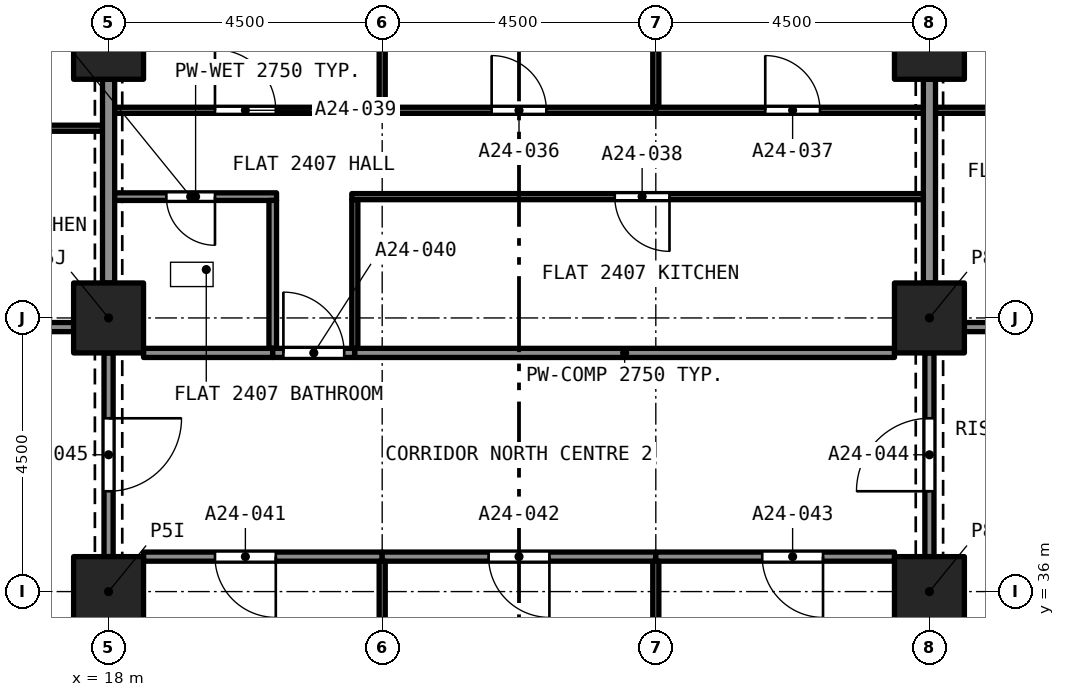
"""IFC4 building model, lengths in metres.
Left out: names, types, materials, properties, quantities, classifications, styles, units other than length and angle.
Written with IfcOpenShell. Run it as: python <this file> out.ifc"""

import sys

from ifc_helpers import new_model, si_unit, direction, frame, frame_2d, origin, origin_2d, place, context, subcontext, project, spatial, rectangle, extrude, element, fill, save


model = new_model("IFC4")
c1 = context("Model", 3, precision=1e-05, world=origin(), true_north=direction((0.0, 1.0)))
c2 = subcontext(c1, "Body", "Model", "MODEL_VIEW")
j1 = project(units=[si_unit("LENGTHUNIT", "METRE"), si_unit("PLANEANGLEUNIT", "RADIAN")], contexts=[c1])
p1 = place(None, origin())
s1 = spatial("IfcSite", under=j1, at=p1, CompositionType="ELEMENT")
p2 = place(p1, origin())
s2 = spatial("IfcBuilding", under=s1, at=p2, CompositionType="ELEMENT")
p3 = place(p2, frame((0.0, 0.0, 89.6)))
s3 = spatial("IfcBuildingStorey", under=s2, at=p3, CompositionType="ELEMENT", Elevation=89.6)
for number, where, z_axis, x_axis in (
    (1, (18.0, 36.0, 0.0), (0.0, 0.0, 1.0), (1.0, 0.0, 0.0)),
    (2, (31.5, 36.0, 0.0), (0.0, 0.0, 1.0), (1.0, 0.0, 0.0)),
    (3, (18.0, 40.5, 0.0), (0.0, 0.0, 1.0), (1.0, 0.0, 0.0)),
    (4, (31.5, 40.5, 0.0), (0.0, 0.0, 1.0), (1.0, 0.0, 0.0)),
    (5, (18.0, 45.0, 0.0), (0.0, 0.0, 1.0), (1.0, 0.0, 0.0)),
    (6, (31.5, 45.0, 0.0), (0.0, 0.0, 1.0), (1.0, 0.0, 0.0)),
):
    element("IfcColumn", number, at=place(p3, frame(where, z_axis=z_axis, x_axis=x_axis)), inside=s3, PredefinedType="COLUMN", context=c2, shape_type="SweptSolid", body=[
        extrude(rectangle(XDim=1.15, YDim=1.15, at=origin_2d()), origin(), (0.0, 0.0, 1.0), 3.2),
    ])
p4 = place(p3, frame((17.9, 43.62, 0.0), z_axis=(0.0, 0.0, 1.0), x_axis=(-1.0, 0.0, 0.0)))
e7 = element("IfcWall", 7, at=p4, inside=s3, PredefinedType="PARTITIONING", context=c2, shape_type="SweptSolid", body=[
    extrude(rectangle(XDim=6.172, YDim=0.1, at=frame_2d((3.086, 0.0))), origin(), (0.0, 0.0, 1.0), 2.9),
])
p5 = place(p4, frame((2.586, 0.0, 0.0)))
e8 = element("IfcOpeningElement", 8, at=p5, cuts=e7, PredefinedType="OPENING", context=c2, shape_type="SweptSolid", body=[
    extrude(rectangle(XDim=0.9, YDim=2.1, at=frame_2d((0.45, 1.05))), frame((0.0, 0.06, 0.0), z_axis=(0.0, -1.0, 0.0), x_axis=(1.0, 0.0, 0.0)), (0.0, 0.0, 1.0), 0.12),
])
p6 = place(p3, frame((18.0, 41.075, 0.0), z_axis=(0.0, 0.0, 1.0), x_axis=(0.0, 1.0, 0.0)))
e9 = element("IfcWall", 9, at=p6, inside=s3, PredefinedType="PARTITIONING", context=c2, shape_type="SweptSolid", body=[
    extrude(rectangle(XDim=3.35, YDim=0.2, at=frame_2d((1.675, 0.0))), origin(), (0.0, 0.0, 1.0), 2.38),
])
p7 = place(p3, frame((13.35, 40.35, 0.0), z_axis=(0.0, 0.0, 1.0), x_axis=(1.0, 0.0, 0.0)))
e10 = element("IfcWall", 10, at=p7, inside=s3, PredefinedType="PARTITIONING", context=c2, shape_type="SweptSolid", body=[
    extrude(rectangle(XDim=4.075, YDim=0.15, at=frame_2d((2.038, 0.0))), origin(), (0.0, 0.0, 1.0), 2.9),
])
p8 = place(p3, frame((31.6, 43.915, 0.0), z_axis=(0.0, 0.0, 1.0), x_axis=(1.0, 0.0, 0.0)))
e11 = element("IfcWall", 11, at=p8, inside=s3, PredefinedType="PARTITIONING", context=c2, shape_type="SweptSolid", body=[
    extrude(rectangle(XDim=4.4, YDim=0.1, at=frame_2d((2.2, 0.0))), origin(), (0.0, 0.0, 1.0), 2.9),
])
p9 = place(p8, frame((1.65, 0.0, 0.0)))
e12 = element("IfcOpeningElement", 12, at=p9, cuts=e11, PredefinedType="OPENING", context=c2, shape_type="SweptSolid", body=[
    extrude(rectangle(XDim=1.0, YDim=2.1, at=frame_2d((0.5, 1.05))), frame((0.0, 0.06, 0.0), z_axis=(0.0, -1.0, 0.0), x_axis=(1.0, 0.0, 0.0)), (0.0, 0.0, 1.0), 0.12),
])
p10 = place(p3, frame((31.5, 41.075, 0.0), z_axis=(0.0, 0.0, 1.0), x_axis=(0.0, 1.0, 0.0)))
e13 = element("IfcWall", 13, at=p10, inside=s3, PredefinedType="PARTITIONING", context=c2, shape_type="SweptSolid", body=[
    extrude(rectangle(XDim=3.35, YDim=0.2, at=frame_2d((1.675, 0.0))), origin(), (0.0, 0.0, 1.0), 2.38),
])
p11 = place(p3, frame((32.075, 40.35, 0.0), z_axis=(0.0, 0.0, 1.0), x_axis=(1.0, 0.0, 0.0)))
e14 = element("IfcWall", 14, at=p11, inside=s3, PredefinedType="PARTITIONING", context=c2, shape_type="SweptSolid", body=[
    extrude(rectangle(XDim=2.35, YDim=0.15, at=frame_2d((1.175, 0.0))), origin(), (0.0, 0.0, 1.0), 2.9),
])
p12 = place(p11, frame((1.175, 0.0, 0.0)))
e15 = element("IfcOpeningElement", 15, at=p12, cuts=e14, PredefinedType="OPENING", context=c2, shape_type="SweptSolid", body=[
    extrude(rectangle(XDim=1.0, YDim=2.1, at=frame_2d((0.5, 1.05))), frame((0.0, 0.085, 0.0), z_axis=(0.0, -1.0, 0.0), x_axis=(1.0, 0.0, 0.0)), (0.0, 0.0, 1.0), 0.17),
])
p13 = place(p3, frame((20.762, 42.495, 0.0), z_axis=(0.0, 0.0, 1.0), x_axis=(-1.0, 0.0, 0.0)))
e16 = element("IfcWall", 16, at=p13, inside=s3, PredefinedType="PARTITIONING", context=c2, shape_type="SweptSolid", body=[
    extrude(rectangle(XDim=2.662, YDim=0.125, at=frame_2d((1.331, 0.0))), origin(), (0.0, 0.0, 1.0), 2.75),
])
p14 = place(p13, frame((1.012, 0.0, 0.0)))
e17 = element("IfcOpeningElement", 17, at=p14, cuts=e16, PredefinedType="OPENING", context=c2, shape_type="SweptSolid", body=[
    extrude(rectangle(XDim=0.8, YDim=2.1, at=frame_2d((0.4, 1.05))), frame((0.0, 0.073, 0.0), z_axis=(0.0, -1.0, 0.0), x_axis=(1.0, 0.0, 0.0)), (0.0, 0.0, 1.0), 0.145),
])
p15 = place(p3, frame((20.7, 40.0, 0.0), z_axis=(0.0, 0.0, 1.0), x_axis=(0.0, 1.0, 0.0)))
e18 = element("IfcWall", 18, at=p15, inside=s3, PredefinedType="PARTITIONING", context=c2, shape_type="SweptSolid", body=[
    extrude(rectangle(XDim=2.433, YDim=0.125, at=frame_2d((1.216, 0.0))), origin(), (0.0, 0.0, 1.0), 2.75),
])
p16 = place(p3, frame((18.575, 39.925, 0.0), z_axis=(0.0, 0.0, 1.0), x_axis=(1.0, 0.0, 0.0)))
e19 = element("IfcWall", 19, at=p16, inside=s3, PredefinedType="PARTITIONING", context=c2, shape_type="SweptSolid", body=[
    extrude(rectangle(XDim=2.125, YDim=0.15, at=frame_2d((1.062, 0.0))), origin(), (0.0, 0.0, 1.0), 2.75),
])
p17 = place(p3, frame((27.0, 43.965, 0.0), z_axis=(0.0, 0.0, 1.0), x_axis=(0.0, 1.0, 0.0)))
e20 = element("IfcWall", 20, at=p17, inside=s3, PredefinedType="PARTITIONING", context=c2, shape_type="SweptSolid", body=[
    extrude(rectangle(XDim=4.96, YDim=0.1, at=frame_2d((2.48, 0.0))), origin(), (0.0, 0.0, 1.0), 2.75),
])
p18 = place(p3, frame((22.5, 43.915, 0.0), z_axis=(0.0, 0.0, 1.0), x_axis=(1.0, 0.0, 0.0)))
e21 = element("IfcWall", 21, at=p18, inside=s3, PredefinedType="PARTITIONING", context=c2, shape_type="SweptSolid", body=[
    extrude(rectangle(XDim=4.5, YDim=0.1, at=frame_2d((2.25, 0.0))), origin(), (0.0, 0.0, 1.0), 2.75),
])
p19 = place(p18, frame((1.8, 0.0, 0.0)))
e22 = element("IfcOpeningElement", 22, at=p19, cuts=e21, PredefinedType="OPENING", context=c2, shape_type="SweptSolid", body=[
    extrude(rectangle(XDim=0.9, YDim=2.1, at=frame_2d((0.45, 1.05))), frame((0.0, 0.06, 0.0), z_axis=(0.0, -1.0, 0.0), x_axis=(1.0, 0.0, 0.0)), (0.0, 0.0, 1.0), 0.12),
])
p20 = place(p3, frame((22.5, 43.965, 0.0), z_axis=(0.0, 0.0, 1.0), x_axis=(0.0, 1.0, 0.0)))
e23 = element("IfcWall", 23, at=p20, inside=s3, PredefinedType="PARTITIONING", context=c2, shape_type="SweptSolid", body=[
    extrude(rectangle(XDim=4.96, YDim=0.1, at=frame_2d((2.48, 0.0))), origin(), (0.0, 0.0, 1.0), 2.75),
])
p21 = place(p3, frame((27.0, 43.915, 0.0), z_axis=(0.0, 0.0, 1.0), x_axis=(1.0, 0.0, 0.0)))
e24 = element("IfcWall", 24, at=p21, inside=s3, PredefinedType="PARTITIONING", context=c2, shape_type="SweptSolid", body=[
    extrude(rectangle(XDim=4.4, YDim=0.1, at=frame_2d((2.2, 0.0))), origin(), (0.0, 0.0, 1.0), 2.75),
])
p22 = place(p21, frame((1.8, 0.0, 0.0)))
e25 = element("IfcOpeningElement", 25, at=p22, cuts=e24, PredefinedType="OPENING", context=c2, shape_type="SweptSolid", body=[
    extrude(rectangle(XDim=0.9, YDim=2.1, at=frame_2d((0.45, 1.05))), frame((0.0, 0.06, 0.0), z_axis=(0.0, -1.0, 0.0), x_axis=(1.0, 0.0, 0.0)), (0.0, 0.0, 1.0), 0.12),
])
p23 = place(p3, frame((31.4, 42.495, 0.0), z_axis=(0.0, 0.0, 1.0), x_axis=(-1.0, 0.0, 0.0)))
e26 = element("IfcWall", 26, at=p23, inside=s3, PredefinedType="PARTITIONING", context=c2, shape_type="SweptSolid", body=[
    extrude(rectangle(XDim=9.4, YDim=0.1, at=frame_2d((4.7, 0.0))), origin(), (0.0, 0.0, 1.0), 2.75),
])
p24 = place(p23, frame((4.175, 0.0, 0.0)))
e27 = element("IfcOpeningElement", 27, at=p24, cuts=e26, PredefinedType="OPENING", context=c2, shape_type="SweptSolid", body=[
    extrude(rectangle(XDim=0.9, YDim=2.1, at=frame_2d((0.45, 1.05))), frame((0.0, 0.06, 0.0), z_axis=(0.0, -1.0, 0.0), x_axis=(1.0, 0.0, 0.0)), (0.0, 0.0, 1.0), 0.12),
])
p25 = place(p3, frame((22.05, 40.0, 0.0), z_axis=(0.0, 0.0, 1.0), x_axis=(0.0, 1.0, 0.0)))
e28 = element("IfcWall", 28, at=p25, inside=s3, PredefinedType="PARTITIONING", context=c2, shape_type="SweptSolid", body=[
    extrude(rectangle(XDim=2.445, YDim=0.1, at=frame_2d((1.223, 0.0))), origin(), (0.0, 0.0, 1.0), 2.75),
])
p26 = place(p3, frame((18.1, 43.915, 0.0), z_axis=(0.0, 0.0, 1.0), x_axis=(1.0, 0.0, 0.0)))
e29 = element("IfcWall", 29, at=p26, inside=s3, PredefinedType="PARTITIONING", context=c2, shape_type="SweptSolid", body=[
    extrude(rectangle(XDim=4.4, YDim=0.1, at=frame_2d((2.2, 0.0))), origin(), (0.0, 0.0, 1.0), 2.75),
])
p27 = place(p26, frame((1.65, 0.0, 0.0)))
e30 = element("IfcOpeningElement", 30, at=p27, cuts=e29, PredefinedType="OPENING", context=c2, shape_type="SweptSolid", body=[
    extrude(rectangle(XDim=1.0, YDim=2.1, at=frame_2d((0.5, 1.05))), frame((0.0, 0.06, 0.0), z_axis=(0.0, -1.0, 0.0), x_axis=(1.0, 0.0, 0.0)), (0.0, 0.0, 1.0), 0.12),
])
p28 = place(p3, frame((20.7, 39.925, 0.0), z_axis=(0.0, 0.0, 1.0), x_axis=(1.0, 0.0, 0.0)))
e31 = element("IfcWall", 31, at=p28, inside=s3, PredefinedType="PARTITIONING", context=c2, shape_type="SweptSolid", body=[
    extrude(rectangle(XDim=1.35, YDim=0.15, at=frame_2d((0.675, 0.0))), origin(), (0.0, 0.0, 1.0), 2.75),
])
p29 = place(p28, frame((0.175, 0.0, 0.0)))
e32 = element("IfcOpeningElement", 32, at=p29, cuts=e31, PredefinedType="OPENING", context=c2, shape_type="SweptSolid", body=[
    extrude(rectangle(XDim=1.0, YDim=2.1, at=frame_2d((0.5, 1.05))), frame((0.0, 0.085, 0.0), z_axis=(0.0, -1.0, 0.0), x_axis=(1.0, 0.0, 0.0)), (0.0, 0.0, 1.0), 0.17),
])
p30 = place(p3, frame((22.05, 39.925, 0.0), z_axis=(0.0, 0.0, 1.0), x_axis=(1.0, 0.0, 0.0)))
e33 = element("IfcWall", 33, at=p30, inside=s3, PredefinedType="PARTITIONING", context=c2, shape_type="SweptSolid", body=[
    extrude(rectangle(XDim=8.875, YDim=0.15, at=frame_2d((4.438, 0.0))), origin(), (0.0, 0.0, 1.0), 2.75),
])
p31 = place(p3, frame((22.5, 36.575, 0.0), z_axis=(0.0, 0.0, 1.0), x_axis=(-1.0, 0.0, 0.0)))
e34 = element("IfcWall", 34, at=p31, inside=s3, PredefinedType="PARTITIONING", context=c2, shape_type="SweptSolid", body=[
    extrude(rectangle(XDim=3.925, YDim=0.15, at=frame_2d((1.962, 0.0))), origin(), (0.0, 0.0, 1.0), 2.75),
])
p32 = place(p31, frame((1.75, 0.0, 0.0)))
e35 = element("IfcOpeningElement", 35, at=p32, cuts=e34, PredefinedType="OPENING", context=c2, shape_type="SweptSolid", body=[
    extrude(rectangle(XDim=1.0, YDim=2.1, at=frame_2d((0.5, 1.05))), frame((0.0, 0.085, 0.0), z_axis=(0.0, -1.0, 0.0), x_axis=(1.0, 0.0, 0.0)), (0.0, 0.0, 1.0), 0.17),
])
p33 = place(p3, frame((27.0, 36.575, 0.0), z_axis=(0.0, 0.0, 1.0), x_axis=(-1.0, 0.0, 0.0)))
e36 = element("IfcWall", 36, at=p33, inside=s3, PredefinedType="PARTITIONING", context=c2, shape_type="SweptSolid", body=[
    extrude(rectangle(XDim=4.5, YDim=0.15, at=frame_2d((2.25, 0.0))), origin(), (0.0, 0.0, 1.0), 2.75),
])
p34 = place(p33, frame((1.75, 0.0, 0.0)))
e37 = element("IfcOpeningElement", 37, at=p34, cuts=e36, PredefinedType="OPENING", context=c2, shape_type="SweptSolid", body=[
    extrude(rectangle(XDim=1.0, YDim=2.1, at=frame_2d((0.5, 1.05))), frame((0.0, 0.085, 0.0), z_axis=(0.0, -1.0, 0.0), x_axis=(1.0, 0.0, 0.0)), (0.0, 0.0, 1.0), 0.17),
])
p35 = place(p3, frame((30.925, 36.575, 0.0), z_axis=(0.0, 0.0, 1.0), x_axis=(-1.0, 0.0, 0.0)))
e38 = element("IfcWall", 38, at=p35, inside=s3, PredefinedType="PARTITIONING", context=c2, shape_type="SweptSolid", body=[
    extrude(rectangle(XDim=3.925, YDim=0.15, at=frame_2d((1.962, 0.0))), origin(), (0.0, 0.0, 1.0), 2.75),
])
p36 = place(p35, frame((1.175, 0.0, 0.0)))
e39 = element("IfcOpeningElement", 39, at=p36, cuts=e38, PredefinedType="OPENING", context=c2, shape_type="SweptSolid", body=[
    extrude(rectangle(XDim=1.0, YDim=2.1, at=frame_2d((0.5, 1.05))), frame((0.0, 0.085, 0.0), z_axis=(0.0, -1.0, 0.0), x_axis=(1.0, 0.0, 0.0)), (0.0, 0.0, 1.0), 0.17),
])
p37 = place(p3, frame((31.5, 36.575, 0.0), z_axis=(0.0, 0.0, 1.0), x_axis=(0.0, 1.0, 0.0)))
e40 = element("IfcWall", 40, at=p37, inside=s3, PredefinedType="PARTITIONING", context=c2, shape_type="SweptSolid", body=[
    extrude(rectangle(XDim=3.35, YDim=0.15, at=frame_2d((1.675, 0.0))), origin(), (0.0, 0.0, 1.0), 2.38),
])
p38 = place(p37, frame((1.075, 0.0, 0.0)))
e41 = element("IfcOpeningElement", 41, at=p38, cuts=e40, PredefinedType="OPENING", context=c2, shape_type="SweptSolid", body=[
    extrude(rectangle(XDim=1.2, YDim=2.1, at=frame_2d((0.6, 1.05))), frame((0.0, 0.085, 0.0), z_axis=(0.0, -1.0, 0.0), x_axis=(1.0, 0.0, 0.0)), (0.0, 0.0, 1.0), 0.17),
])
p39 = place(p3, frame((18.0, 39.925, 0.0), z_axis=(0.0, 0.0, 1.0), x_axis=(0.0, -1.0, 0.0)))
e42 = element("IfcWall", 42, at=p39, inside=s3, PredefinedType="PARTITIONING", context=c2, shape_type="SweptSolid", body=[
    extrude(rectangle(XDim=3.35, YDim=0.15, at=frame_2d((1.675, 0.0))), origin(), (0.0, 0.0, 1.0), 2.38),
])
p40 = place(p39, frame((1.075, 0.0, 0.0)))
e43 = element("IfcOpeningElement", 43, at=p40, cuts=e42, PredefinedType="OPENING", context=c2, shape_type="SweptSolid", body=[
    extrude(rectangle(XDim=1.2, YDim=2.1, at=frame_2d((0.6, 1.05))), frame((0.0, 0.085, 0.0), z_axis=(0.0, -1.0, 0.0), x_axis=(1.0, 0.0, 0.0)), (0.0, 0.0, 1.0), 0.17),
])
for number, where, z_axis, x_axis in (
    (44, (22.5, 26.375, 0.0), (0.0, 0.0, 1.0), (0.0, 1.0, 0.0)),
    (45, (27.0, 26.375, 0.0), (0.0, 0.0, 1.0), (0.0, 1.0, 0.0)),
):
    element("IfcWall", number, at=place(p3, frame(where, z_axis=z_axis, x_axis=x_axis)), inside=s3, PredefinedType="PARTITIONING", context=c2, shape_type="SweptSolid", body=[
        extrude(rectangle(XDim=10.125, YDim=0.1, at=frame_2d((5.062, 0.0))), origin(), (0.0, 0.0, 1.0), 2.75),
    ])
p41 = place(p14, origin())
e46 = element("IfcDoor", 46, at=p41, inside=s3, OperationType="SINGLE_SWING_RIGHT", PredefinedType="DOOR", context=c2, shape_type="SweptSolid", body=[
    extrude(rectangle(XDim=0.8, YDim=2.1, at=frame_2d((0.4, 1.05))), frame((0.0, 0.025, 0.0), z_axis=(0.0, -1.0, 0.0), x_axis=(1.0, 0.0, 0.0)), (0.0, 0.0, 1.0), 0.05),
])
fill(e17, e46)
p42 = place(p19, origin())
e47 = element("IfcDoor", 47, at=p42, inside=s3, OperationType="SINGLE_SWING_LEFT", PredefinedType="DOOR", context=c2, shape_type="SweptSolid", body=[
    extrude(rectangle(XDim=0.9, YDim=2.1, at=frame_2d((0.45, 1.05))), frame((0.0, 0.025, 0.0), z_axis=(0.0, -1.0, 0.0), x_axis=(1.0, 0.0, 0.0)), (0.0, 0.0, 1.0), 0.05),
])
fill(e22, e47)
p43 = place(p22, origin())
e48 = element("IfcDoor", 48, at=p43, inside=s3, OperationType="SINGLE_SWING_RIGHT", PredefinedType="DOOR", context=c2, shape_type="SweptSolid", body=[
    extrude(rectangle(XDim=0.9, YDim=2.1, at=frame_2d((0.45, 1.05))), frame((0.0, 0.025, 0.0), z_axis=(0.0, -1.0, 0.0), x_axis=(1.0, 0.0, 0.0)), (0.0, 0.0, 1.0), 0.05),
])
fill(e25, e48)
p44 = place(p24, origin())
e49 = element("IfcDoor", 49, at=p44, inside=s3, OperationType="SINGLE_SWING_LEFT", PredefinedType="DOOR", context=c2, shape_type="SweptSolid", body=[
    extrude(rectangle(XDim=0.9, YDim=2.1, at=frame_2d((0.45, 1.05))), frame((0.0, 0.025, 0.0), z_axis=(0.0, -1.0, 0.0), x_axis=(1.0, 0.0, 0.0)), (0.0, 0.0, 1.0), 0.05),
])
fill(e27, e49)
p45 = place(p27, origin())
e50 = element("IfcDoor", 50, at=p45, inside=s3, OperationType="SINGLE_SWING_LEFT", PredefinedType="DOOR", context=c2, shape_type="SweptSolid", body=[
    extrude(rectangle(XDim=1.0, YDim=2.1, at=frame_2d((0.5, 1.05))), frame((0.0, 0.025, 0.0), z_axis=(0.0, -1.0, 0.0), x_axis=(1.0, 0.0, 0.0)), (0.0, 0.0, 1.0), 0.05),
])
fill(e30, e50)
p46 = place(p29, origin())
e51 = element("IfcDoor", 51, at=p46, inside=s3, OperationType="SINGLE_SWING_RIGHT", PredefinedType="DOOR", context=c2, shape_type="SweptSolid", body=[
    extrude(rectangle(XDim=1.0, YDim=2.1, at=frame_2d((0.5, 1.05))), frame((0.0, 0.025, 0.0), z_axis=(0.0, -1.0, 0.0), x_axis=(1.0, 0.0, 0.0)), (0.0, 0.0, 1.0), 0.05),
])
fill(e32, e51)
p47 = place(p32, origin())
e52 = element("IfcDoor", 52, at=p47, inside=s3, OperationType="SINGLE_SWING_RIGHT", PredefinedType="DOOR", context=c2, shape_type="SweptSolid", body=[
    extrude(rectangle(XDim=1.0, YDim=2.1, at=frame_2d((0.5, 1.05))), frame((0.0, 0.025, 0.0), z_axis=(0.0, -1.0, 0.0), x_axis=(1.0, 0.0, 0.0)), (0.0, 0.0, 1.0), 0.05),
])
fill(e35, e52)
p48 = place(p34, origin())
e53 = element("IfcDoor", 53, at=p48, inside=s3, OperationType="SINGLE_SWING_RIGHT", PredefinedType="DOOR", context=c2, shape_type="SweptSolid", body=[
    extrude(rectangle(XDim=1.0, YDim=2.1, at=frame_2d((0.5, 1.05))), frame((0.0, 0.025, 0.0), z_axis=(0.0, -1.0, 0.0), x_axis=(1.0, 0.0, 0.0)), (0.0, 0.0, 1.0), 0.05),
])
fill(e37, e53)
p49 = place(p36, origin())
e54 = element("IfcDoor", 54, at=p49, inside=s3, OperationType="SINGLE_SWING_LEFT", PredefinedType="DOOR", context=c2, shape_type="SweptSolid", body=[
    extrude(rectangle(XDim=1.0, YDim=2.1, at=frame_2d((0.5, 1.05))), frame((0.0, 0.025, 0.0), z_axis=(0.0, -1.0, 0.0), x_axis=(1.0, 0.0, 0.0)), (0.0, 0.0, 1.0), 0.05),
])
fill(e39, e54)
p50 = place(p38, origin())
e55 = element("IfcDoor", 55, at=p50, inside=s3, OperationType="SINGLE_SWING_LEFT", PredefinedType="DOOR", context=c2, shape_type="SweptSolid", body=[
    extrude(rectangle(XDim=1.2, YDim=2.1, at=frame_2d((0.6, 1.05))), frame((0.0, 0.025, 0.0), z_axis=(0.0, -1.0, 0.0), x_axis=(1.0, 0.0, 0.0)), (0.0, 0.0, 1.0), 0.05),
])
fill(e41, e55)
p51 = place(p40, origin())
e56 = element("IfcDoor", 56, at=p51, inside=s3, OperationType="SINGLE_SWING_LEFT", PredefinedType="DOOR", context=c2, shape_type="SweptSolid", body=[
    extrude(rectangle(XDim=1.2, YDim=2.1, at=frame_2d((0.6, 1.05))), frame((0.0, 0.025, 0.0), z_axis=(0.0, -1.0, 0.0), x_axis=(1.0, 0.0, 0.0)), (0.0, 0.0, 1.0), 0.05),
])
fill(e43, e56)
save(model, sys.argv[1])
